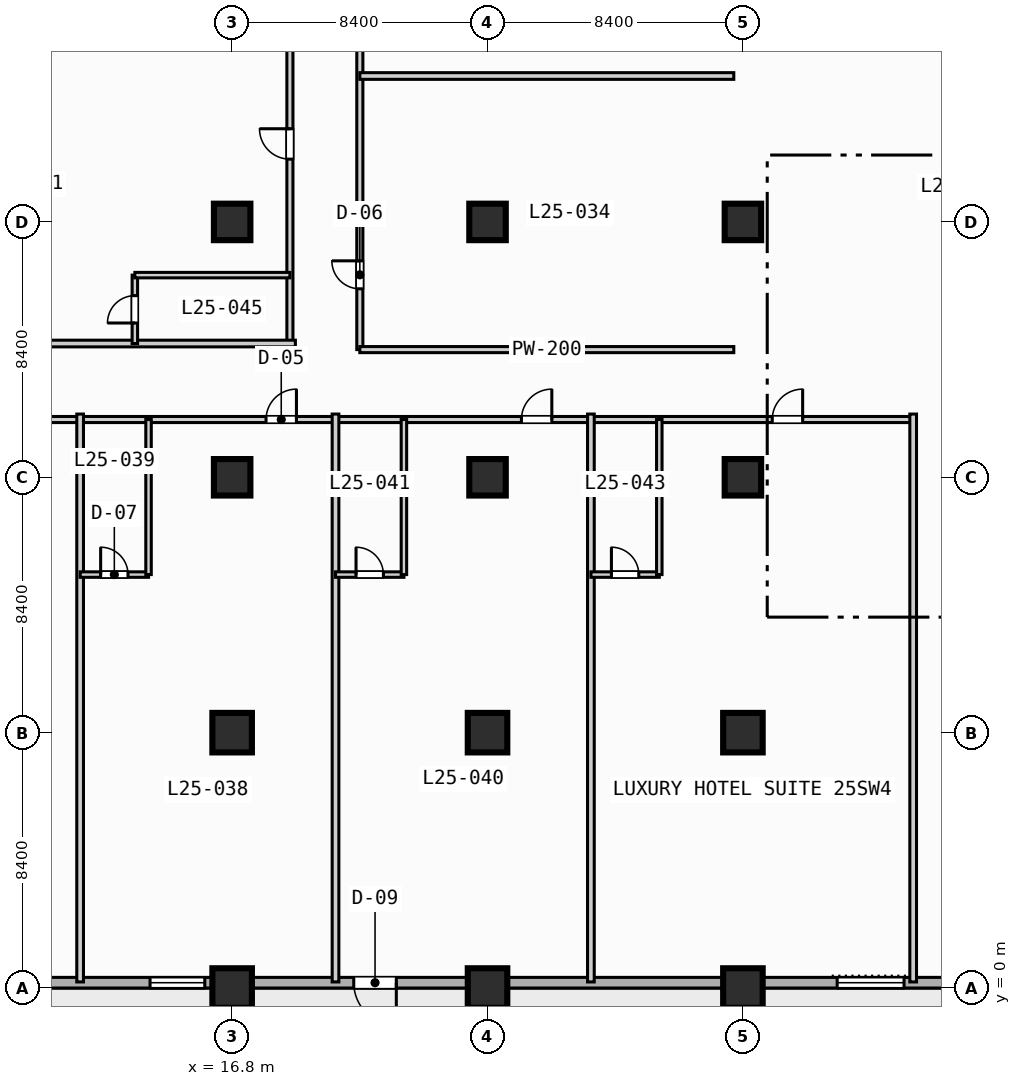
"""IFC4 building model, lengths in metres.
Left out: names, types, materials, properties, quantities, classifications, styles, units other than length and angle.
Written with IfcOpenShell. Run it as: python <this file> out.ifc"""

import sys

from ifc_helpers import new_model, si_unit, direction, frame, frame_2d, origin, origin_2d, place, context, subcontext, project, spatial, rectangle, extrude, element, fill, save


model = new_model("IFC4")
c1 = context("Model", 3, precision=1e-05, world=origin(), true_north=direction((0.0, 1.0)))
c2 = subcontext(c1, "Body", "Model", "MODEL_VIEW")
j1 = project(units=[si_unit("LENGTHUNIT", "METRE"), si_unit("PLANEANGLEUNIT", "RADIAN")], contexts=[c1])
p1 = place(None, origin())
s1 = spatial("IfcSite", under=j1, at=p1, CompositionType="ELEMENT")
p2 = place(p1, origin())
s2 = spatial("IfcBuilding", under=s1, at=p2, CompositionType="ELEMENT")
p3 = place(p2, frame((0.0, 0.0, 107.6)))
s3 = spatial("IfcBuildingStorey", under=s2, at=p3, CompositionType="ELEMENT", Elevation=107.6)
for number, where, z_axis, x_axis in (
    (1, (16.8, 0.0, 0.0), (0.0, 0.0, 1.0), (1.0, 0.0, 0.0)),
    (2, (16.8, 8.4, 0.0), (0.0, 0.0, 1.0), (1.0, 0.0, 0.0)),
):
    element("IfcColumn", number, at=place(p3, frame(where, z_axis=z_axis, x_axis=x_axis)), inside=s3, PredefinedType="COLUMN", context=c2, shape_type="SweptSolid", body=[
        extrude(rectangle(XDim=1.3, YDim=1.3, at=origin_2d()), origin(), (0.0, 0.0, 1.0), 3.8),
    ])
for number, where, z_axis, x_axis in (
    (3, (16.8, 16.8, 0.0), (0.0, 0.0, 1.0), (1.0, 0.0, 0.0)),
    (4, (16.8, 25.2, 0.0), (0.0, 0.0, 1.0), (1.0, 0.0, 0.0)),
):
    element("IfcColumn", number, at=place(p3, frame(where, z_axis=z_axis, x_axis=x_axis)), inside=s3, PredefinedType="COLUMN", context=c2, shape_type="SweptSolid", body=[
        extrude(rectangle(XDim=1.2, YDim=1.2, at=origin_2d()), origin(), (0.0, 0.0, 1.0), 3.8),
    ])
for number, where, z_axis, x_axis in (
    (5, (25.2, 0.0, 0.0), (0.0, 0.0, 1.0), (1.0, 0.0, 0.0)),
    (6, (25.2, 8.4, 0.0), (0.0, 0.0, 1.0), (1.0, 0.0, 0.0)),
):
    element("IfcColumn", number, at=place(p3, frame(where, z_axis=z_axis, x_axis=x_axis)), inside=s3, PredefinedType="COLUMN", context=c2, shape_type="SweptSolid", body=[
        extrude(rectangle(XDim=1.3, YDim=1.3, at=origin_2d()), origin(), (0.0, 0.0, 1.0), 3.8),
    ])
for number, where, z_axis, x_axis in (
    (7, (25.2, 16.8, 0.0), (0.0, 0.0, 1.0), (1.0, 0.0, 0.0)),
    (8, (25.2, 25.2, 0.0), (0.0, 0.0, 1.0), (1.0, 0.0, 0.0)),
):
    element("IfcColumn", number, at=place(p3, frame(where, z_axis=z_axis, x_axis=x_axis)), inside=s3, PredefinedType="COLUMN", context=c2, shape_type="SweptSolid", body=[
        extrude(rectangle(XDim=1.2, YDim=1.2, at=origin_2d()), origin(), (0.0, 0.0, 1.0), 3.8),
    ])
for number, where, z_axis, x_axis in (
    (9, (33.6, 0.0, 0.0), (0.0, 0.0, 1.0), (1.0, 0.0, 0.0)),
    (10, (33.6, 8.4, 0.0), (0.0, 0.0, 1.0), (1.0, 0.0, 0.0)),
):
    element("IfcColumn", number, at=place(p3, frame(where, z_axis=z_axis, x_axis=x_axis)), inside=s3, PredefinedType="COLUMN", context=c2, shape_type="SweptSolid", body=[
        extrude(rectangle(XDim=1.3, YDim=1.3, at=origin_2d()), origin(), (0.0, 0.0, 1.0), 3.8),
    ])
for number, where, z_axis, x_axis in (
    (11, (33.6, 16.8, 0.0), (0.0, 0.0, 1.0), (1.0, 0.0, 0.0)),
    (12, (33.6, 25.2, 0.0), (0.0, 0.0, 1.0), (1.0, 0.0, 0.0)),
):
    element("IfcColumn", number, at=place(p3, frame(where, z_axis=z_axis, x_axis=x_axis)), inside=s3, PredefinedType="COLUMN", context=c2, shape_type="SweptSolid", body=[
        extrude(rectangle(XDim=1.2, YDim=1.2, at=origin_2d()), origin(), (0.0, 0.0, 1.0), 3.8),
    ])
p4 = place(p3, frame((72.425, 0.175, 0.0), z_axis=(0.0, 0.0, 1.0), x_axis=(-1.0, 0.0, 0.0)))
e13 = element("IfcWall", 13, at=p4, inside=s3, PredefinedType="STANDARD", context=c2, shape_type="SweptSolid", body=[
    extrude(rectangle(XDim=69.25, YDim=0.35, at=frame_2d((34.625, 0.0))), origin(), (0.0, 0.0, 1.0), 3.55),
])
p5 = place(p4, frame((50.225, 0.0, 0.0)))
e14 = element("IfcOpeningElement", 14, at=p5, cuts=e13, PredefinedType="OPENING", context=c2, shape_type="SweptSolid", body=[
    extrude(rectangle(XDim=1.4, YDim=2.2, at=frame_2d((0.7, 1.1))), frame((0.0, 0.185, 0.0), z_axis=(0.0, -1.0, 0.0), x_axis=(1.0, 0.0, 0.0)), (0.0, 0.0, 1.0), 0.37),
])
p6 = place(p4, frame((33.525, 0.0, 0.85)))
e15 = element("IfcOpeningElement", 15, at=p6, cuts=e13, PredefinedType="OPENING", context=c2, shape_type="SweptSolid", body=[
    extrude(rectangle(XDim=2.2, YDim=1.8, at=frame_2d((1.1, 0.9))), frame((0.0, 0.185, 0.0), z_axis=(0.0, -1.0, 0.0), x_axis=(1.0, 0.0, 0.0)), (0.0, 0.0, 1.0), 0.37),
])
p7 = place(p4, frame((25.125, 0.0, 0.85)))
e16 = element("IfcOpeningElement", 16, at=p7, cuts=e13, PredefinedType="OPENING", context=c2, shape_type="SweptSolid", body=[
    extrude(rectangle(XDim=2.2, YDim=1.8, at=frame_2d((1.1, 0.9))), frame((0.0, 0.185, 0.0), z_axis=(0.0, -1.0, 0.0), x_axis=(1.0, 0.0, 0.0)), (0.0, 0.0, 1.0), 0.37),
])
p8 = place(p4, frame((8.325, 0.0, 0.85)))
e17 = element("IfcOpeningElement", 17, at=p8, cuts=e13, PredefinedType="OPENING", context=c2, shape_type="SweptSolid", body=[
    extrude(rectangle(XDim=2.2, YDim=1.8, at=frame_2d((1.1, 0.9))), frame((0.0, 0.185, 0.0), z_axis=(0.0, -1.0, 0.0), x_axis=(1.0, 0.0, 0.0)), (0.0, 0.0, 1.0), 0.37),
])
p9 = place(p4, frame((64.925, 0.0, 0.85)))
e18 = element("IfcOpeningElement", 18, at=p9, cuts=e13, PredefinedType="OPENING", context=c2, shape_type="SweptSolid", body=[
    extrude(rectangle(XDim=1.8, YDim=1.8, at=frame_2d((0.9, 0.9))), frame((0.0, 0.185, 0.0), z_axis=(0.0, -1.0, 0.0), x_axis=(1.0, 0.0, 0.0)), (0.0, 0.0, 1.0), 0.37),
])
p10 = place(p4, frame((56.525, 0.0, 0.85)))
e19 = element("IfcOpeningElement", 19, at=p10, cuts=e13, PredefinedType="OPENING", context=c2, shape_type="SweptSolid", body=[
    extrude(rectangle(XDim=1.8, YDim=1.8, at=frame_2d((0.9, 0.9))), frame((0.0, 0.185, 0.0), z_axis=(0.0, -1.0, 0.0), x_axis=(1.0, 0.0, 0.0)), (0.0, 0.0, 1.0), 0.37),
])
p11 = place(p4, frame((2.125, 0.0, 0.85)))
e20 = element("IfcOpeningElement", 20, at=p11, cuts=e13, PredefinedType="OPENING", context=c2, shape_type="SweptSolid", body=[
    extrude(rectangle(XDim=1.8, YDim=1.8, at=frame_2d((0.9, 0.9))), frame((0.0, 0.185, 0.0), z_axis=(0.0, -1.0, 0.0), x_axis=(1.0, 0.0, 0.0)), (0.0, 0.0, 1.0), 0.37),
])
p12 = place(p3, frame((21.0, 21.0, 0.0), z_axis=(0.0, 0.0, 1.0), x_axis=(0.0, 1.0, 0.0)))
e21 = element("IfcWall", 21, at=p12, inside=s3, PredefinedType="PARTITIONING", context=c2, shape_type="SweptSolid", body=[
    extrude(rectangle(XDim=18.2, YDim=0.2, at=frame_2d((9.1, 0.0))), origin(), (0.0, 0.0, 1.0), 3.55),
])
p13 = place(p12, frame((2.0, 0.0, 0.0)))
e22 = element("IfcOpeningElement", 22, at=p13, cuts=e21, PredefinedType="OPENING", context=c2, shape_type="SweptSolid", body=[
    extrude(rectangle(XDim=0.92, YDim=2.1, at=frame_2d((0.46, 1.05))), frame((0.0, 0.11, 0.0), z_axis=(0.0, -1.0, 0.0), x_axis=(1.0, 0.0, 0.0)), (0.0, 0.0, 1.0), 0.22),
])
p14 = place(p12, frame((11.0, 0.0, 0.0)))
e23 = element("IfcOpeningElement", 23, at=p14, cuts=e21, PredefinedType="OPENING", context=c2, shape_type="SweptSolid", body=[
    extrude(rectangle(XDim=0.92, YDim=2.1, at=frame_2d((0.46, 1.05))), frame((0.0, 0.11, 0.0), z_axis=(0.0, -1.0, 0.0), x_axis=(1.0, 0.0, 0.0)), (0.0, 0.0, 1.0), 0.22),
])
p15 = place(p3, frame((21.0, 21.0, 0.0), z_axis=(0.0, 0.0, 1.0), x_axis=(1.0, 0.0, 0.0)))
e24 = element("IfcWall", 24, at=p15, inside=s3, PredefinedType="PARTITIONING", context=c2, shape_type="SweptSolid", body=[
    extrude(rectangle(XDim=12.3, YDim=0.2, at=frame_2d((6.15, 0.0))), origin(), (0.0, 0.0, 1.0), 3.55),
])
p16 = place(p3, frame((21.0, 30.0, 0.0), z_axis=(0.0, 0.0, 1.0), x_axis=(1.0, 0.0, 0.0)))
e25 = element("IfcWall", 25, at=p16, inside=s3, PredefinedType="PARTITIONING", context=c2, shape_type="SweptSolid", body=[
    extrude(rectangle(XDim=12.3, YDim=0.22, at=frame_2d((6.15, 0.0))), origin(), (0.0, 0.0, 1.0), 3.55),
])
p17 = place(p3, frame((3.4, 18.7, 0.0), z_axis=(0.0, 0.0, 1.0), x_axis=(1.0, 0.0, 0.0)))
e26 = element("IfcWall", 26, at=p17, inside=s3, PredefinedType="PARTITIONING", context=c2, shape_type="SweptSolid", body=[
    extrude(rectangle(XDim=35.8, YDim=0.2, at=frame_2d((17.9, 0.0))), origin(), (0.0, 0.0, 1.0), 3.55),
])
p18 = place(p17, frame((6.115, 0.0, 0.0)))
e27 = element("IfcOpeningElement", 27, at=p18, cuts=e26, PredefinedType="OPENING", context=c2, shape_type="SweptSolid", body=[
    extrude(rectangle(XDim=1.0, YDim=2.15, at=frame_2d((0.5, 1.075))), frame((0.0, 0.11, 0.0), z_axis=(0.0, -1.0, 0.0), x_axis=(1.0, 0.0, 0.0)), (0.0, 0.0, 1.0), 0.22),
])
p19 = place(p17, frame((14.515, 0.0, 0.0)))
e28 = element("IfcOpeningElement", 28, at=p19, cuts=e26, PredefinedType="OPENING", context=c2, shape_type="SweptSolid", body=[
    extrude(rectangle(XDim=1.0, YDim=2.15, at=frame_2d((0.5, 1.075))), frame((0.0, 0.11, 0.0), z_axis=(0.0, -1.0, 0.0), x_axis=(1.0, 0.0, 0.0)), (0.0, 0.0, 1.0), 0.22),
])
p20 = place(p17, frame((22.915, 0.0, 0.0)))
e29 = element("IfcOpeningElement", 29, at=p20, cuts=e26, PredefinedType="OPENING", context=c2, shape_type="SweptSolid", body=[
    extrude(rectangle(XDim=1.0, YDim=2.15, at=frame_2d((0.5, 1.075))), frame((0.0, 0.11, 0.0), z_axis=(0.0, -1.0, 0.0), x_axis=(1.0, 0.0, 0.0)), (0.0, 0.0, 1.0), 0.22),
])
p21 = place(p17, frame((31.165, 0.0, 0.0)))
e30 = element("IfcOpeningElement", 30, at=p21, cuts=e26, PredefinedType="OPENING", context=c2, shape_type="SweptSolid", body=[
    extrude(rectangle(XDim=1.0, YDim=2.15, at=frame_2d((0.5, 1.075))), frame((0.0, 0.11, 0.0), z_axis=(0.0, -1.0, 0.0), x_axis=(1.0, 0.0, 0.0)), (0.0, 0.0, 1.0), 0.22),
])
p22 = place(p3, frame((11.8, 0.2, 0.0), z_axis=(0.0, 0.0, 1.0), x_axis=(0.0, 1.0, 0.0)))
e31 = element("IfcWall", 31, at=p22, inside=s3, PredefinedType="PARTITIONING", context=c2, shape_type="SweptSolid", body=[
    extrude(rectangle(XDim=18.68, YDim=0.22, at=frame_2d((9.34, 0.0))), origin(), (0.0, 0.0, 1.0), 3.55),
])
p23 = place(p3, frame((11.8, 13.6, 0.0), z_axis=(0.0, 0.0, 1.0), x_axis=(1.0, 0.0, 0.0)))
e32 = element("IfcWall", 32, at=p23, inside=s3, PredefinedType="PLUMBINGWALL", context=c2, shape_type="SweptSolid", body=[
    extrude(rectangle(XDim=2.25, YDim=0.18, at=frame_2d((1.125, 0.0))), origin(), (0.0, 0.0, 1.0), 3.55),
])
p24 = place(p23, frame((0.675, 0.0, 0.0)))
e33 = element("IfcOpeningElement", 33, at=p24, cuts=e32, PredefinedType="OPENING", context=c2, shape_type="SweptSolid", body=[
    extrude(rectangle(XDim=0.9, YDim=2.1, at=frame_2d((0.45, 1.05))), frame((0.0, 0.1, 0.0), z_axis=(0.0, -1.0, 0.0), x_axis=(1.0, 0.0, 0.0)), (0.0, 0.0, 1.0), 0.2),
])
p25 = place(p3, frame((14.05, 13.6, 0.0), z_axis=(0.0, 0.0, 1.0), x_axis=(0.0, 1.0, 0.0)))
e34 = element("IfcWall", 34, at=p25, inside=s3, PredefinedType="PLUMBINGWALL", context=c2, shape_type="SweptSolid", body=[
    extrude(rectangle(XDim=5.1, YDim=0.18, at=frame_2d((2.55, 0.0))), origin(), (0.0, 0.0, 1.0), 3.55),
])
p26 = place(p3, frame((20.2, 0.2, 0.0), z_axis=(0.0, 0.0, 1.0), x_axis=(0.0, 1.0, 0.0)))
e35 = element("IfcWall", 35, at=p26, inside=s3, PredefinedType="PARTITIONING", context=c2, shape_type="SweptSolid", body=[
    extrude(rectangle(XDim=18.68, YDim=0.22, at=frame_2d((9.34, 0.0))), origin(), (0.0, 0.0, 1.0), 3.55),
])
p27 = place(p3, frame((20.2, 13.6, 0.0), z_axis=(0.0, 0.0, 1.0), x_axis=(1.0, 0.0, 0.0)))
e36 = element("IfcWall", 36, at=p27, inside=s3, PredefinedType="PLUMBINGWALL", context=c2, shape_type="SweptSolid", body=[
    extrude(rectangle(XDim=2.25, YDim=0.18, at=frame_2d((1.125, 0.0))), origin(), (0.0, 0.0, 1.0), 3.55),
])
p28 = place(p27, frame((0.675, 0.0, 0.0)))
e37 = element("IfcOpeningElement", 37, at=p28, cuts=e36, PredefinedType="OPENING", context=c2, shape_type="SweptSolid", body=[
    extrude(rectangle(XDim=0.9, YDim=2.1, at=frame_2d((0.45, 1.05))), frame((0.0, 0.1, 0.0), z_axis=(0.0, -1.0, 0.0), x_axis=(1.0, 0.0, 0.0)), (0.0, 0.0, 1.0), 0.2),
])
p29 = place(p3, frame((22.45, 13.6, 0.0), z_axis=(0.0, 0.0, 1.0), x_axis=(0.0, 1.0, 0.0)))
e38 = element("IfcWall", 38, at=p29, inside=s3, PredefinedType="PLUMBINGWALL", context=c2, shape_type="SweptSolid", body=[
    extrude(rectangle(XDim=5.1, YDim=0.18, at=frame_2d((2.55, 0.0))), origin(), (0.0, 0.0, 1.0), 3.55),
])
for number, where, z_axis, x_axis in (
    (39, (28.6, 0.2, 0.0), (0.0, 0.0, 1.0), (0.0, 1.0, 0.0)),
    (40, (39.2, 0.2, 0.0), (0.0, 0.0, 1.0), (0.0, 1.0, 0.0)),
):
    element("IfcWall", number, at=place(p3, frame(where, z_axis=z_axis, x_axis=x_axis)), inside=s3, PredefinedType="PARTITIONING", context=c2, shape_type="SweptSolid", body=[
        extrude(rectangle(XDim=18.68, YDim=0.22, at=frame_2d((9.34, 0.0))), origin(), (0.0, 0.0, 1.0), 3.55),
    ])
p30 = place(p3, frame((28.6, 13.6, 0.0), z_axis=(0.0, 0.0, 1.0), x_axis=(1.0, 0.0, 0.0)))
e41 = element("IfcWall", 41, at=p30, inside=s3, PredefinedType="PLUMBINGWALL", context=c2, shape_type="SweptSolid", body=[
    extrude(rectangle(XDim=2.25, YDim=0.18, at=frame_2d((1.125, 0.0))), origin(), (0.0, 0.0, 1.0), 3.55),
])
p31 = place(p30, frame((0.675, 0.0, 0.0)))
e42 = element("IfcOpeningElement", 42, at=p31, cuts=e41, PredefinedType="OPENING", context=c2, shape_type="SweptSolid", body=[
    extrude(rectangle(XDim=0.9, YDim=2.1, at=frame_2d((0.45, 1.05))), frame((0.0, 0.1, 0.0), z_axis=(0.0, -1.0, 0.0), x_axis=(1.0, 0.0, 0.0)), (0.0, 0.0, 1.0), 0.2),
])
p32 = place(p3, frame((30.85, 13.6, 0.0), z_axis=(0.0, 0.0, 1.0), x_axis=(0.0, 1.0, 0.0)))
e43 = element("IfcWall", 43, at=p32, inside=s3, PredefinedType="PLUMBINGWALL", context=c2, shape_type="SweptSolid", body=[
    extrude(rectangle(XDim=5.1, YDim=0.18, at=frame_2d((2.55, 0.0))), origin(), (0.0, 0.0, 1.0), 3.55),
])
p33 = place(p3, frame((18.7, 21.2, 0.0), z_axis=(0.0, 0.0, 1.0), x_axis=(0.0, 1.0, 0.0)))
e44 = element("IfcWall", 44, at=p33, inside=s3, PredefinedType="PARTITIONING", context=c2, shape_type="SweptSolid", body=[
    extrude(rectangle(XDim=18.0, YDim=0.2, at=frame_2d((9.0, 0.0))), origin(), (0.0, 0.0, 1.0), 3.55),
])
p34 = place(p33, frame((6.065, 0.0, 0.0)))
e45 = element("IfcOpeningElement", 45, at=p34, cuts=e44, PredefinedType="OPENING", context=c2, shape_type="SweptSolid", body=[
    extrude(rectangle(XDim=1.0, YDim=2.15, at=frame_2d((0.5, 1.075))), frame((0.0, 0.11, 0.0), z_axis=(0.0, -1.0, 0.0), x_axis=(1.0, 0.0, 0.0)), (0.0, 0.0, 1.0), 0.22),
])
p35 = place(p33, frame((13.485, 0.0, 0.0)))
e46 = element("IfcOpeningElement", 46, at=p35, cuts=e44, PredefinedType="OPENING", context=c2, shape_type="SweptSolid", body=[
    extrude(rectangle(XDim=1.0, YDim=2.15, at=frame_2d((0.5, 1.075))), frame((0.0, 0.11, 0.0), z_axis=(0.0, -1.0, 0.0), x_axis=(1.0, 0.0, 0.0)), (0.0, 0.0, 1.0), 0.22),
])
p36 = place(p3, frame((0.2, 21.2, 0.0), z_axis=(0.0, 0.0, 1.0), x_axis=(1.0, 0.0, 0.0)))
e47 = element("IfcWall", 47, at=p36, inside=s3, PredefinedType="PARTITIONING", context=c2, shape_type="SweptSolid", body=[
    extrude(rectangle(XDim=18.68, YDim=0.22, at=frame_2d((9.34, 0.0))), origin(), (0.0, 0.0, 1.0), 3.55),
])
p37 = place(p3, frame((13.6, 21.2, 0.0), z_axis=(0.0, 0.0, 1.0), x_axis=(0.0, 1.0, 0.0)))
e48 = element("IfcWall", 48, at=p37, inside=s3, PredefinedType="PLUMBINGWALL", context=c2, shape_type="SweptSolid", body=[
    extrude(rectangle(XDim=2.25, YDim=0.18, at=frame_2d((1.125, 0.0))), origin(), (0.0, 0.0, 1.0), 3.55),
])
p38 = place(p37, frame((0.675, 0.0, 0.0)))
e49 = element("IfcOpeningElement", 49, at=p38, cuts=e48, PredefinedType="OPENING", context=c2, shape_type="SweptSolid", body=[
    extrude(rectangle(XDim=0.9, YDim=2.1, at=frame_2d((0.45, 1.05))), frame((0.0, 0.1, 0.0), z_axis=(0.0, -1.0, 0.0), x_axis=(1.0, 0.0, 0.0)), (0.0, 0.0, 1.0), 0.2),
])
p39 = place(p3, frame((13.6, 23.45, 0.0), z_axis=(0.0, 0.0, 1.0), x_axis=(1.0, 0.0, 0.0)))
e50 = element("IfcWall", 50, at=p39, inside=s3, PredefinedType="PLUMBINGWALL", context=c2, shape_type="SweptSolid", body=[
    extrude(rectangle(XDim=5.1, YDim=0.18, at=frame_2d((2.55, 0.0))), origin(), (0.0, 0.0, 1.0), 3.55),
])
p40 = place(p5, origin())
e51 = element("IfcDoor", 51, at=p40, inside=s3, OperationType="SINGLE_SWING_LEFT", PredefinedType="DOOR", context=c2, shape_type="SweptSolid", body=[
    extrude(rectangle(XDim=1.4, YDim=2.2, at=frame_2d((0.7, 1.1))), frame((0.0, 0.025, 0.0), z_axis=(0.0, -1.0, 0.0), x_axis=(1.0, 0.0, 0.0)), (0.0, 0.0, 1.0), 0.05),
])
fill(e14, e51)
p41 = place(p6, origin())
e52 = element("IfcWindow", 52, at=p41, inside=s3, PartitioningType="SINGLE_PANEL", PredefinedType="WINDOW", context=c2, shape_type="SweptSolid", body=[
    extrude(rectangle(XDim=2.2, YDim=1.8, at=frame_2d((1.1, 0.9))), frame((0.0, 0.03, 0.0), z_axis=(0.0, -1.0, 0.0), x_axis=(1.0, 0.0, 0.0)), (0.0, 0.0, 1.0), 0.06),
])
fill(e15, e52)
p42 = place(p10, origin())
e53 = element("IfcWindow", 53, at=p42, inside=s3, PartitioningType="SINGLE_PANEL", PredefinedType="WINDOW", context=c2, shape_type="SweptSolid", body=[
    extrude(rectangle(XDim=1.8, YDim=1.8, at=frame_2d((0.9, 0.9))), frame((0.0, 0.03, 0.0), z_axis=(0.0, -1.0, 0.0), x_axis=(1.0, 0.0, 0.0)), (0.0, 0.0, 1.0), 0.06),
])
fill(e19, e53)
p43 = place(p13, origin())
e54 = element("IfcDoor", 54, at=p43, inside=s3, OperationType="SINGLE_SWING_RIGHT", PredefinedType="DOOR", context=c2, shape_type="SweptSolid", body=[
    extrude(rectangle(XDim=0.92, YDim=2.1, at=frame_2d((0.46, 1.05))), frame((0.0, 0.025, 0.0), z_axis=(0.0, -1.0, 0.0), x_axis=(1.0, 0.0, 0.0)), (0.0, 0.0, 1.0), 0.05),
])
fill(e22, e54)
p44 = place(p19, origin())
e55 = element("IfcDoor", 55, at=p44, inside=s3, OperationType="SINGLE_SWING_RIGHT", PredefinedType="DOOR", context=c2, shape_type="SweptSolid", body=[
    extrude(rectangle(XDim=1.0, YDim=2.15, at=frame_2d((0.5, 1.075))), frame((0.0, 0.025, 0.0), z_axis=(0.0, -1.0, 0.0), x_axis=(1.0, 0.0, 0.0)), (0.0, 0.0, 1.0), 0.05),
])
fill(e28, e55)
p45 = place(p20, origin())
e56 = element("IfcDoor", 56, at=p45, inside=s3, OperationType="SINGLE_SWING_RIGHT", PredefinedType="DOOR", context=c2, shape_type="SweptSolid", body=[
    extrude(rectangle(XDim=1.0, YDim=2.15, at=frame_2d((0.5, 1.075))), frame((0.0, 0.025, 0.0), z_axis=(0.0, -1.0, 0.0), x_axis=(1.0, 0.0, 0.0)), (0.0, 0.0, 1.0), 0.05),
])
fill(e29, e56)
p46 = place(p21, origin())
e57 = element("IfcDoor", 57, at=p46, inside=s3, OperationType="SINGLE_SWING_RIGHT", PredefinedType="DOOR", context=c2, shape_type="SweptSolid", body=[
    extrude(rectangle(XDim=1.0, YDim=2.15, at=frame_2d((0.5, 1.075))), frame((0.0, 0.025, 0.0), z_axis=(0.0, -1.0, 0.0), x_axis=(1.0, 0.0, 0.0)), (0.0, 0.0, 1.0), 0.05),
])
fill(e30, e57)
p47 = place(p24, origin())
e58 = element("IfcDoor", 58, at=p47, inside=s3, OperationType="SINGLE_SWING_LEFT", PredefinedType="DOOR", context=c2, shape_type="SweptSolid", body=[
    extrude(rectangle(XDim=0.9, YDim=2.1, at=frame_2d((0.45, 1.05))), frame((0.0, 0.025, 0.0), z_axis=(0.0, -1.0, 0.0), x_axis=(1.0, 0.0, 0.0)), (0.0, 0.0, 1.0), 0.05),
])
fill(e33, e58)
p48 = place(p28, origin())
e59 = element("IfcDoor", 59, at=p48, inside=s3, OperationType="SINGLE_SWING_LEFT", PredefinedType="DOOR", context=c2, shape_type="SweptSolid", body=[
    extrude(rectangle(XDim=0.9, YDim=2.1, at=frame_2d((0.45, 1.05))), frame((0.0, 0.025, 0.0), z_axis=(0.0, -1.0, 0.0), x_axis=(1.0, 0.0, 0.0)), (0.0, 0.0, 1.0), 0.05),
])
fill(e37, e59)
p49 = place(p31, origin())
e60 = element("IfcDoor", 60, at=p49, inside=s3, OperationType="SINGLE_SWING_LEFT", PredefinedType="DOOR", context=c2, shape_type="SweptSolid", body=[
    extrude(rectangle(XDim=0.9, YDim=2.1, at=frame_2d((0.45, 1.05))), frame((0.0, 0.025, 0.0), z_axis=(0.0, -1.0, 0.0), x_axis=(1.0, 0.0, 0.0)), (0.0, 0.0, 1.0), 0.05),
])
fill(e42, e60)
p50 = place(p34, origin())
e61 = element("IfcDoor", 61, at=p50, inside=s3, OperationType="SINGLE_SWING_RIGHT", PredefinedType="DOOR", context=c2, shape_type="SweptSolid", body=[
    extrude(rectangle(XDim=1.0, YDim=2.15, at=frame_2d((0.5, 1.075))), frame((0.0, 0.025, 0.0), z_axis=(0.0, -1.0, 0.0), x_axis=(1.0, 0.0, 0.0)), (0.0, 0.0, 1.0), 0.05),
])
fill(e45, e61)
p51 = place(p38, origin())
e62 = element("IfcDoor", 62, at=p51, inside=s3, OperationType="SINGLE_SWING_LEFT", PredefinedType="DOOR", context=c2, shape_type="SweptSolid", body=[
    extrude(rectangle(XDim=0.9, YDim=2.1, at=frame_2d((0.45, 1.05))), frame((0.0, 0.025, 0.0), z_axis=(0.0, -1.0, 0.0), x_axis=(1.0, 0.0, 0.0)), (0.0, 0.0, 1.0), 0.05),
])
fill(e49, e62)
save(model, sys.argv[1])
